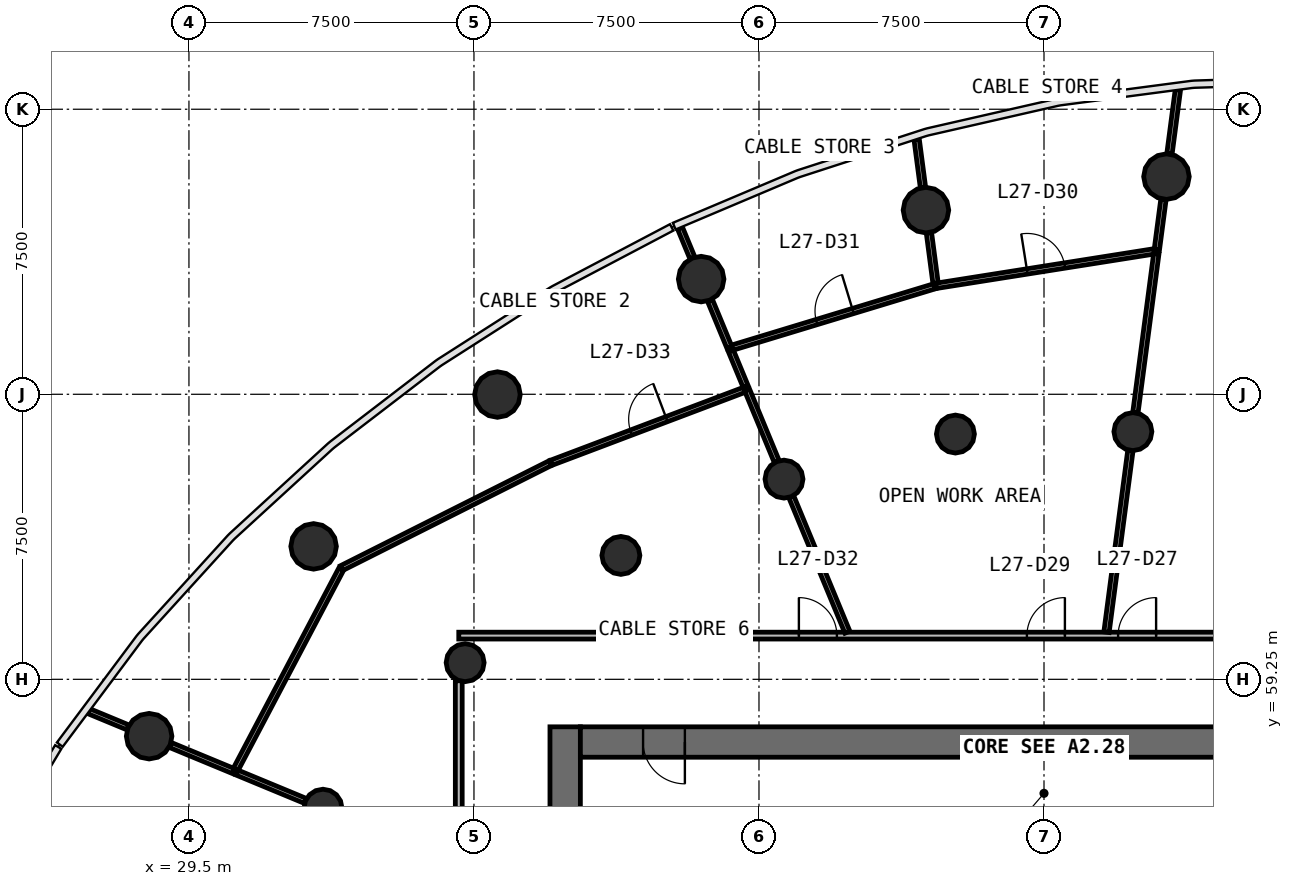
"""IFC4 building model, lengths in metres.
Left out: names, types, materials, properties, quantities, classifications, styles, units other than length and angle.
Written with IfcOpenShell. Run it as: python <this file> out.ifc"""

import sys

from ifc_helpers import new_model, si_unit, direction, frame, frame_2d, origin, origin_2d, place, context, subcontext, project, spatial, rectangle, circle, extrude, source, transform, mapped, element, fill, save


model = new_model("IFC4")
c1 = context("Model", 3, precision=1e-05, world=origin(), true_north=direction((0.0, 1.0)))
c2 = subcontext(c1, "Body", "Model", "MODEL_VIEW")
j1 = project(units=[si_unit("LENGTHUNIT", "METRE"), si_unit("PLANEANGLEUNIT", "RADIAN")], contexts=[c1])
p1 = place(None, origin())
s1 = spatial("IfcSite", under=j1, at=p1, CompositionType="ELEMENT")
p2 = place(p1, origin())
s2 = spatial("IfcBuilding", under=s1, at=p2, CompositionType="ELEMENT")
p3 = place(p2, frame((0.0, 0.0, 116.7)))
s3 = spatial("IfcBuildingStorey", under=s2, at=p3, CompositionType="ELEMENT", Elevation=116.7)
p4 = place(p3, frame((39.4, 58.0, 0.0), z_axis=(0.0, 0.0, 1.0), x_axis=(0.0, -1.0, 0.0)))
e1 = element("IfcWall", 1, at=p4, inside=s3, PredefinedType="SHEAR", context=c2, shape_type="SweptSolid", body=[
    extrude(rectangle(XDim=20.0, YDim=0.8, at=frame_2d((10.0, 0.0))), origin(), (0.0, 0.0, 1.0), 4.1),
])
p5 = place(p4, frame((9.1, 0.0, 0.0)))
e2 = element("IfcOpeningElement", 2, at=p5, cuts=e1, PredefinedType="OPENING", context=c2, shape_type="SweptSolid", body=[
    extrude(rectangle(XDim=1.8, YDim=2.1, at=frame_2d((0.9, 1.05))), frame((0.0, 0.41, 0.0), z_axis=(0.0, -1.0, 0.0), x_axis=(1.0, 0.0, 0.0)), (0.0, 0.0, 1.0), 0.82),
])
p6 = place(p3, frame((64.2, 57.6, 0.0), z_axis=(0.0, 0.0, 1.0), x_axis=(-1.0, 0.0, 0.0)))
e3 = element("IfcWall", 3, at=p6, inside=s3, PredefinedType="SHEAR", context=c2, shape_type="SweptSolid", body=[
    extrude(rectangle(XDim=24.4, YDim=0.8, at=frame_2d((12.2, 0.0))), origin(), (0.0, 0.0, 1.0), 4.1),
])
p7 = place(p6, frame((21.65, 0.0, 0.0)))
e4 = element("IfcOpeningElement", 4, at=p7, cuts=e3, PredefinedType="OPENING", context=c2, shape_type="SweptSolid", body=[
    extrude(rectangle(XDim=1.1, YDim=2.1, at=frame_2d((0.55, 1.05))), frame((0.0, 0.41, 0.0), z_axis=(0.0, -1.0, 0.0), x_axis=(1.0, 0.0, 0.0)), (0.0, 0.0, 1.0), 0.82),
])
p8 = place(p6, frame((2.15, 0.0, 0.0)))
e5 = element("IfcOpeningElement", 5, at=p8, cuts=e3, PredefinedType="OPENING", context=c2, shape_type="SweptSolid", body=[
    extrude(rectangle(XDim=1.1, YDim=2.1, at=frame_2d((0.55, 1.05))), frame((0.0, 0.41, 0.0), z_axis=(0.0, -1.0, 0.0), x_axis=(1.0, 0.0, 0.0)), (0.0, 0.0, 1.0), 0.82),
])
m1 = source(origin(), c2, "Body", "SweptSolid", [
    extrude(circle(Radius=0.6, at=origin_2d()), origin(), (0.0, 0.0, 1.0), 4.1),
])
for number, where, z_axis, x_axis in (
    (6, (55.222, 72.477, 0.0), (0.0, 0.0, 1.0), (1.0, 0.0, 0.0)),
    (7, (48.894, 71.595, 0.0), (0.0, 0.0, 1.0), (1.0, 0.0, 0.0)),
    (8, (42.978, 69.781, 0.0), (0.0, 0.0, 1.0), (1.0, 0.0, 0.0)),
    (9, (37.618, 66.743, 0.0), (0.0, 0.0, 1.0), (1.0, 0.0, 0.0)),
    (10, (32.78, 62.748, 0.0), (0.0, 0.0, 1.0), (1.0, 0.0, 0.0)),
    (11, (28.452, 57.754, 0.0), (0.0, 0.0, 1.0), (1.0, 0.0, 0.0)),
):
    element("IfcColumn", number, at=place(p3, frame(where, z_axis=z_axis, x_axis=x_axis)), inside=s3, PredefinedType="COLUMN", context=c2, shape_type="MappedRepresentation", body=[
        mapped(m1, transform((0.0, 0.0, 0.0), scale=1.0)),
    ])
m2 = source(origin(), c2, "Body", "SweptSolid", [
    extrude(circle(Radius=0.5, at=origin_2d()), origin(), (0.0, 0.0, 1.0), 4.1),
])
for number, where, z_axis, x_axis in (
    (12, (54.339, 65.767, 0.0), (0.0, 0.0, 1.0), (1.0, 0.0, 0.0)),
    (13, (49.669, 65.703, 0.0), (0.0, 0.0, 1.0), (1.0, 0.0, 0.0)),
    (14, (45.158, 64.518, 0.0), (0.0, 0.0, 1.0), (1.0, 0.0, 0.0)),
    (15, (40.866, 62.51, 0.0), (0.0, 0.0, 1.0), (1.0, 0.0, 0.0)),
    (16, (36.768, 59.688, 0.0), (0.0, 0.0, 1.0), (1.0, 0.0, 0.0)),
    (17, (33.028, 55.859, 0.0), (0.0, 0.0, 1.0), (1.0, 0.0, 0.0)),
):
    element("IfcColumn", number, at=place(p3, frame(where, z_axis=z_axis, x_axis=x_axis)), inside=s3, PredefinedType="COLUMN", context=c2, shape_type="MappedRepresentation", body=[
        mapped(m2, transform((0.0, 0.0, 0.0), scale=1.0)),
    ])
p9 = place(p3, frame((36.6, 60.4, 0.0), z_axis=(0.0, 0.0, 1.0), x_axis=(1.0, 0.0, 0.0)))
e18 = element("IfcWall", 18, at=p9, inside=s3, PredefinedType="PARTITIONING", context=c2, shape_type="SweptSolid", body=[
    extrude(rectangle(XDim=30.8, YDim=0.18, at=frame_2d((15.4, 0.0))), origin(), (0.0, 0.0, 1.0), 2.9),
])
p10 = place(p9, frame((17.35, 0.0, 0.0)))
e19 = element("IfcOpeningElement", 19, at=p10, cuts=e18, PredefinedType="OPENING", context=c2, shape_type="SweptSolid", body=[
    extrude(rectangle(XDim=1.0, YDim=2.1, at=frame_2d((0.5, 1.05))), frame((0.0, 0.1, 0.0), z_axis=(0.0, -1.0, 0.0), x_axis=(1.0, 0.0, 0.0)), (0.0, 0.0, 1.0), 0.2),
])
p11 = place(p9, frame((14.95, 0.0, 0.0)))
e20 = element("IfcOpeningElement", 20, at=p11, cuts=e18, PredefinedType="OPENING", context=c2, shape_type="SweptSolid", body=[
    extrude(rectangle(XDim=1.0, YDim=2.1, at=frame_2d((0.5, 1.05))), frame((0.0, 0.1, 0.0), z_axis=(0.0, -1.0, 0.0), x_axis=(1.0, 0.0, 0.0)), (0.0, 0.0, 1.0), 0.2),
])
p12 = place(p9, frame((8.95, 0.0, 0.0)))
e21 = element("IfcOpeningElement", 21, at=p12, cuts=e18, PredefinedType="OPENING", context=c2, shape_type="SweptSolid", body=[
    extrude(rectangle(XDim=1.0, YDim=2.1, at=frame_2d((0.5, 1.05))), frame((0.0, 0.1, 0.0), z_axis=(0.0, -1.0, 0.0), x_axis=(1.0, 0.0, 0.0)), (0.0, 0.0, 1.0), 0.2),
])
p13 = place(p3, frame((36.6, 35.63, 0.0), z_axis=(0.0, 0.0, 1.0), x_axis=(0.0, 1.0, 0.0)))
e22 = element("IfcWall", 22, at=p13, inside=s3, PredefinedType="PARTITIONING", context=c2, shape_type="SweptSolid", body=[
    extrude(rectangle(XDim=23.583, YDim=0.18, at=frame_2d((11.791, 0.0))), origin(), (0.0, 0.0, 1.0), 2.9),
])
p14 = place(p13, frame((14.732, 0.0, 0.0)))
e23 = element("IfcOpeningElement", 23, at=p14, cuts=e22, PredefinedType="OPENING", context=c2, shape_type="SweptSolid", body=[
    extrude(rectangle(XDim=1.0, YDim=2.1, at=frame_2d((0.5, 1.05))), frame((0.0, 0.1, 0.0), z_axis=(0.0, -1.0, 0.0), x_axis=(1.0, 0.0, 0.0)), (0.0, 0.0, 1.0), 0.2),
])
p15 = place(p13, frame((11.333, 0.0, 0.0)))
e24 = element("IfcOpeningElement", 24, at=p15, cuts=e22, PredefinedType="OPENING", context=c2, shape_type="SweptSolid", body=[
    extrude(rectangle(XDim=1.0, YDim=2.1, at=frame_2d((0.5, 1.05))), frame((0.0, 0.1, 0.0), z_axis=(0.0, -1.0, 0.0), x_axis=(1.0, 0.0, 0.0)), (0.0, 0.0, 1.0), 0.2),
])
p16 = place(p3, frame((39.004, 64.937, 0.0), z_axis=(0.0, 0.0, 1.0), x_axis=(-0.893310463622, -0.449440113456, 0.0)))
e25 = element("IfcWall", 25, at=p16, inside=s3, PredefinedType="PARTITIONING", context=c2, shape_type="SweptSolid", body=[
    extrude(rectangle(XDim=6.137, YDim=0.14, at=frame_2d((3.068, 0.0))), origin(), (0.0, 0.0, 1.0), 2.9),
])
p17 = place(p3, frame((33.508, 62.152, 0.0), z_axis=(0.0, 0.0, 1.0), x_axis=(-0.466160635686, -0.88470009706, 0.0)))
e26 = element("IfcWall", 26, at=p17, inside=s3, PredefinedType="PARTITIONING", context=c2, shape_type="SweptSolid", body=[
    extrude(rectangle(XDim=6.024, YDim=0.14, at=frame_2d((3.012, 0.0))), origin(), (0.0, 0.0, 1.0), 2.9),
])
p18 = place(p3, frame((49.156, 69.603, 0.0), z_axis=(0.0, 0.0, 1.0), x_axis=(0.987742424173, 0.156092611898, 0.0)))
e27 = element("IfcWall", 27, at=p18, inside=s3, PredefinedType="PARTITIONING", context=c2, shape_type="SweptSolid", body=[
    extrude(rectangle(XDim=5.881, YDim=0.14, at=frame_2d((2.94, 0.0))), origin(), (0.0, 0.0, 1.0), 2.9),
])
p19 = place(p18, frame((2.431, 0.0, 0.0)))
e28 = element("IfcOpeningElement", 28, at=p19, cuts=e27, PredefinedType="OPENING", context=c2, shape_type="SweptSolid", body=[
    extrude(rectangle(XDim=1.0, YDim=2.1, at=frame_2d((0.5, 1.05))), frame((0.0, 0.08, 0.0), z_axis=(0.0, -1.0, 0.0), x_axis=(1.0, 0.0, 0.0)), (0.0, 0.0, 1.0), 0.16),
])
p20 = place(p3, frame((43.733, 67.957, 0.0), z_axis=(0.0, 0.0, 1.0), x_axis=(0.956926356981, 0.290330755028, 0.0)))
e29 = element("IfcWall", 29, at=p20, inside=s3, PredefinedType="PARTITIONING", context=c2, shape_type="SweptSolid", body=[
    extrude(rectangle(XDim=5.636, YDim=0.14, at=frame_2d((2.818, 0.0))), origin(), (0.0, 0.0, 1.0), 2.9),
])
p21 = place(p20, frame((2.387, 0.0, 0.0)))
e30 = element("IfcOpeningElement", 30, at=p21, cuts=e29, PredefinedType="OPENING", context=c2, shape_type="SweptSolid", body=[
    extrude(rectangle(XDim=1.0, YDim=2.1, at=frame_2d((0.5, 1.05))), frame((0.0, 0.08, 0.0), z_axis=(0.0, -1.0, 0.0), x_axis=(1.0, 0.0, 0.0)), (0.0, 0.0, 1.0), 0.16),
])
p22 = place(p3, frame((39.032, 64.947, 0.0), z_axis=(0.0, 0.0, 1.0), x_axis=(0.935431962105, 0.353506781084, 0.0)))
e31 = element("IfcWall", 31, at=p22, inside=s3, PredefinedType="PARTITIONING", context=c2, shape_type="SweptSolid", body=[
    extrude(rectangle(XDim=5.498, YDim=0.14, at=frame_2d((2.749, 0.0))), origin(), (0.0, 0.0, 1.0), 2.9),
])
p23 = place(p22, frame((2.248, 0.0, 0.0)))
e32 = element("IfcOpeningElement", 32, at=p23, cuts=e31, PredefinedType="OPENING", context=c2, shape_type="SweptSolid", body=[
    extrude(rectangle(XDim=1.0, YDim=2.1, at=frame_2d((0.5, 1.05))), frame((0.0, 0.08, 0.0), z_axis=(0.0, -1.0, 0.0), x_axis=(1.0, 0.0, 0.0)), (0.0, 0.0, 1.0), 0.16),
])
p24 = place(p3, frame((53.644, 60.49, 0.0), z_axis=(0.0, 0.0, 1.0), x_axis=(0.130523979823, 0.991445152639, 0.0)))
e33 = element("IfcWall", 33, at=p24, inside=s3, PredefinedType="PARTITIONING", context=c2, shape_type="SweptSolid", body=[
    extrude(rectangle(XDim=4.818, YDim=0.14, at=frame_2d((2.409, 0.0))), origin(), (0.0, 0.0, 1.0), 2.9),
])
p25 = place(p3, frame((54.405, 66.267, 0.0), z_axis=(0.0, 0.0, 1.0), x_axis=(0.130494948199, 0.991448974226, 0.0)))
e34 = element("IfcWall", 34, at=p25, inside=s3, PredefinedType="PARTITIONING", context=c2, shape_type="SweptSolid", body=[
    extrude(rectangle(XDim=4.217, YDim=0.14, at=frame_2d((2.108, 0.0))), origin(), (0.0, 0.0, 1.0), 2.9),
])
p26 = place(p3, frame((46.826, 60.49, 0.0), z_axis=(0.0, 0.0, 1.0), x_axis=(-0.382644558062, 0.923895633817, 0.0)))
e35 = element("IfcWall", 35, at=p26, inside=s3, PredefinedType="PARTITIONING", context=c2, shape_type="SweptSolid", body=[
    extrude(rectangle(XDim=3.854, YDim=0.14, at=frame_2d((1.927, 0.0))), origin(), (0.0, 0.0, 1.0), 2.9),
])
p27 = place(p3, frame((44.965, 64.984, 0.0), z_axis=(0.0, 0.0, 1.0), x_axis=(-0.382705198342, 0.923870516448, 0.0)))
e36 = element("IfcWall", 36, at=p27, inside=s3, PredefinedType="PARTITIONING", context=c2, shape_type="SweptSolid", body=[
    extrude(rectangle(XDim=2.034, YDim=0.14, at=frame_2d((1.017, 0.0))), origin(), (0.0, 0.0, 1.0), 2.9),
])
p28 = place(p3, frame((32.561, 56.052, 0.0), z_axis=(0.0, 0.0, 1.0), x_axis=(-0.923859136089, 0.382732669974, 0.0)))
e37 = element("IfcWall", 37, at=p28, inside=s3, PredefinedType="PARTITIONING", context=c2, shape_type="SweptSolid", body=[
    extrude(rectangle(XDim=1.944, YDim=0.14, at=frame_2d((0.972, 0.0))), origin(), (0.0, 0.0, 1.0), 2.9),
])
p29 = place(p3, frame((30.673, 56.834, 0.0), z_axis=(0.0, 0.0, 1.0), x_axis=(-0.923914248106, 0.382599610751, 0.0)))
e38 = element("IfcWall", 38, at=p29, inside=s3, PredefinedType="PARTITIONING", context=c2, shape_type="SweptSolid", body=[
    extrude(rectangle(XDim=1.798, YDim=0.14, at=frame_2d((0.899, 0.0))), origin(), (0.0, 0.0, 1.0), 2.9),
])
p30 = place(p3, frame((55.301, 73.076, 0.0), z_axis=(0.0, 0.0, 1.0), x_axis=(0.130536236518, 0.991443538965, 0.0)))
e39 = element("IfcWall", 39, at=p30, inside=s3, PredefinedType="PARTITIONING", context=c2, shape_type="SweptSolid", body=[
    extrude(rectangle(XDim=1.7, YDim=0.14, at=frame_2d((0.85, 0.0))), origin(), (0.0, 0.0, 1.0), 2.9),
])
p31 = place(p3, frame((49.147, 69.672, 0.0), z_axis=(0.0, 0.0, 1.0), x_axis=(-0.13053490902, 0.991443713746, 0.0)))
e40 = element("IfcWall", 40, at=p31, inside=s3, PredefinedType="PARTITIONING", context=c2, shape_type="SweptSolid", body=[
    extrude(rectangle(XDim=1.335, YDim=0.14, at=frame_2d((0.668, 0.0))), origin(), (0.0, 0.0, 1.0), 2.9),
])
p32 = place(p3, frame((54.969, 70.55, 0.0), z_axis=(0.0, 0.0, 1.0), x_axis=(0.130563003548, 0.991440014375, 0.0)))
e41 = element("IfcWall", 41, at=p32, inside=s3, PredefinedType="PARTITIONING", context=c2, shape_type="SweptSolid", body=[
    extrude(rectangle(XDim=1.339, YDim=0.14, at=frame_2d((0.669, 0.0))), origin(), (0.0, 0.0, 1.0), 2.9),
])
p33 = place(p3, frame((43.722, 67.985, 0.0), z_axis=(0.0, 0.0, 1.0), x_axis=(-0.382684725633, 0.923878996821, 0.0)))
e42 = element("IfcWall", 42, at=p33, inside=s3, PredefinedType="PARTITIONING", context=c2, shape_type="SweptSolid", body=[
    extrude(rectangle(XDim=1.338, YDim=0.14, at=frame_2d((0.669, 0.0))), origin(), (0.0, 0.0, 1.0), 2.9),
])
p34 = place(p3, frame((48.815, 72.195, 0.0), z_axis=(0.0, 0.0, 1.0), x_axis=(-0.130583288492, 0.991437342834, 0.0)))
e43 = element("IfcWall", 43, at=p34, inside=s3, PredefinedType="PARTITIONING", context=c2, shape_type="SweptSolid", body=[
    extrude(rectangle(XDim=1.275, YDim=0.14, at=frame_2d((0.638, 0.0))), origin(), (0.0, 0.0, 1.0), 2.9),
])
p35 = place(p3, frame((44.148, 66.955, 0.0), z_axis=(0.0, 0.0, 1.0), x_axis=(-0.382734457734, 0.923858395461, 0.0)))
e44 = element("IfcWall", 44, at=p35, inside=s3, PredefinedType="PARTITIONING", context=c2, shape_type="SweptSolid", body=[
    extrude(rectangle(XDim=1.014, YDim=0.14, at=frame_2d((0.507, 0.0))), origin(), (0.0, 0.0, 1.0), 2.9),
])
p36 = place(p3, frame((27.893, 57.985, 0.0), z_axis=(0.0, 0.0, 1.0), x_axis=(-0.923895360736, 0.382645217415, 0.0)))
e45 = element("IfcWall", 45, at=p36, inside=s3, PredefinedType="PARTITIONING", context=c2, shape_type="SweptSolid", body=[
    extrude(rectangle(XDim=1.127, YDim=0.14, at=frame_2d((0.563, 0.0))), origin(), (0.0, 0.0, 1.0), 2.9),
])
p37 = place(p3, frame((42.747, 70.34, 0.0), z_axis=(0.0, 0.0, 1.0), x_axis=(-0.38271578582, 0.923866130608, 0.0)))
e46 = element("IfcWall", 46, at=p37, inside=s3, PredefinedType="PARTITIONING", context=c2, shape_type="SweptSolid", body=[
    extrude(rectangle(XDim=0.849, YDim=0.14, at=frame_2d((0.425, 0.0))), origin(), (0.0, 0.0, 1.0), 2.9),
])
m3 = source(origin(), c2, "Body", "SweptSolid", [
    extrude(rectangle(XDim=1.1, YDim=2.1, at=frame_2d((0.55, 1.05))), frame((0.0, 0.025, 0.0), z_axis=(0.0, -1.0, 0.0), x_axis=(1.0, 0.0, 0.0)), (0.0, 0.0, 1.0), 0.05),
])
p38 = place(p7, origin())
e47 = element("IfcDoor", 47, at=p38, inside=s3, OperationType="SINGLE_SWING_LEFT", PredefinedType="DOOR", context=c2, shape_type="MappedRepresentation", body=[
    mapped(m3, transform((0.0, 0.0, 0.0), scale=1.0)),
])
fill(e4, e47)
m4 = source(origin(), c2, "Body", "SweptSolid", [
    extrude(rectangle(XDim=1.0, YDim=2.1, at=frame_2d((0.5, 1.05))), frame((0.0, 0.025, 0.0), z_axis=(0.0, -1.0, 0.0), x_axis=(1.0, 0.0, 0.0)), (0.0, 0.0, 1.0), 0.05),
])
p39 = place(p10, origin())
e48 = element("IfcDoor", 48, at=p39, inside=s3, OperationType="SINGLE_SWING_RIGHT", PredefinedType="DOOR", context=c2, shape_type="MappedRepresentation", body=[
    mapped(m4, transform((0.0, 0.0, 0.0), scale=1.0)),
])
fill(e19, e48)
p40 = place(p11, origin())
e49 = element("IfcDoor", 49, at=p40, inside=s3, OperationType="SINGLE_SWING_RIGHT", PredefinedType="DOOR", context=c2, shape_type="MappedRepresentation", body=[
    mapped(m4, transform((0.0, 0.0, 0.0), scale=1.0)),
])
fill(e20, e49)
p41 = place(p19, origin())
e50 = element("IfcDoor", 50, at=p41, inside=s3, OperationType="SINGLE_SWING_LEFT", PredefinedType="DOOR", context=c2, shape_type="MappedRepresentation", body=[
    mapped(m4, transform((0.0, 0.0, 0.0), scale=1.0)),
])
fill(e28, e50)
p42 = place(p21, origin())
e51 = element("IfcDoor", 51, at=p42, inside=s3, OperationType="SINGLE_SWING_RIGHT", PredefinedType="DOOR", context=c2, shape_type="MappedRepresentation", body=[
    mapped(m4, transform((0.0, 0.0, 0.0), scale=1.0)),
])
fill(e30, e51)
p43 = place(p12, origin())
e52 = element("IfcDoor", 52, at=p43, inside=s3, OperationType="SINGLE_SWING_LEFT", PredefinedType="DOOR", context=c2, shape_type="MappedRepresentation", body=[
    mapped(m4, transform((0.0, 0.0, 0.0), scale=1.0)),
])
fill(e21, e52)
p44 = place(p23, origin())
e53 = element("IfcDoor", 53, at=p44, inside=s3, OperationType="SINGLE_SWING_RIGHT", PredefinedType="DOOR", context=c2, shape_type="MappedRepresentation", body=[
    mapped(m4, transform((0.0, 0.0, 0.0), scale=1.0)),
])
fill(e32, e53)
save(model, sys.argv[1])
